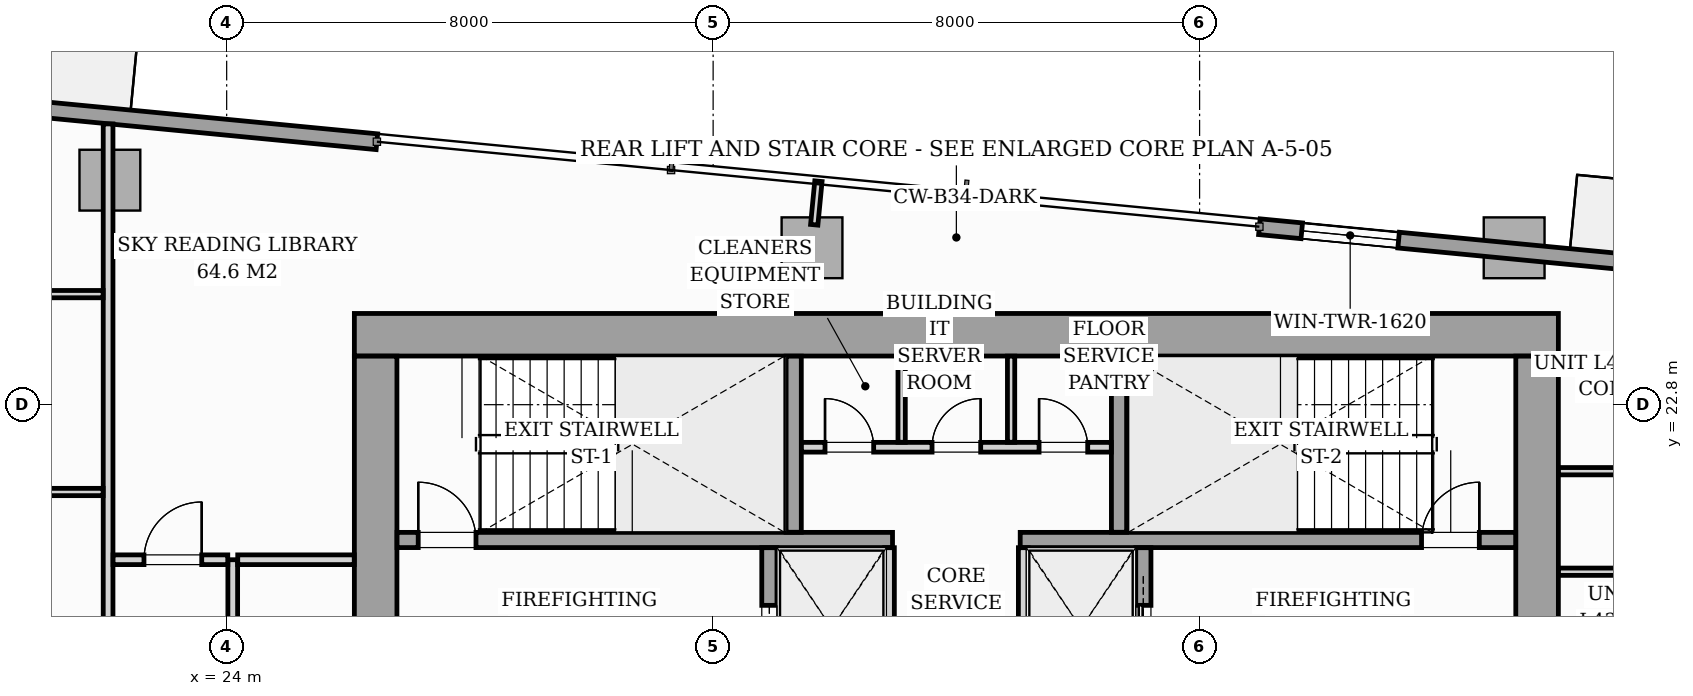
"""IFC4 building model, lengths in metres.
Left out: names, types, materials, properties, quantities, classifications, styles, units other than length and angle.
Written with IfcOpenShell. Run it as: python <this file> out.ifc"""

import sys

from ifc_helpers import new_model, si_unit, direction, frame, frame_2d, origin, origin_2d, place, context, subcontext, project, spatial, rectangle, i_section, extrude, source, transform, mapped, element, fill, save


model = new_model("IFC4")
c1 = context("Model", 3, precision=1e-05, world=origin(), true_north=direction((0.0, 1.0)))
c2 = subcontext(c1, "Body", "Model", "MODEL_VIEW")
j1 = project(units=[si_unit("LENGTHUNIT", "METRE"), si_unit("PLANEANGLEUNIT", "RADIAN")], contexts=[c1])
p1 = place(None, origin())
s1 = spatial("IfcSite", under=j1, at=p1, CompositionType="ELEMENT")
p2 = place(p1, origin())
s2 = spatial("IfcBuilding", under=s1, at=p2, CompositionType="ELEMENT")
p3 = place(p2, frame((0.0, 0.0, 150.2)))
s3 = spatial("IfcBuildingStorey", under=s2, at=p3, CompositionType="ELEMENT", Elevation=150.2)
m1 = source(origin(), c2, "Body", "SweptSolid", [
    extrude(i_section(OverallWidth=0.421, OverallDepth=0.465, WebThickness=0.045, FlangeThickness=0.073, FilletRadius=0.018, at=origin_2d()), origin(), (0.0, 0.0, 1.0), 3.196),
])
for number, where, z_axis, x_axis in (
    (1, (26.4, 24.0, 0.002), (0.0, 0.0, 1.0), (1.0, 0.0, 0.0)),
    (2, (33.12, 24.0, 0.002), (0.0, 0.0, 1.0), (1.0, 0.0, 0.0)),
    (3, (38.88, 24.0, 0.002), (0.0, 0.0, 1.0), (1.0, 0.0, 0.0)),
    (4, (45.6, 24.0, 0.002), (0.0, 0.0, 1.0), (1.0, 0.0, 0.0)),
):
    element("IfcColumn", number, at=place(p3, frame(where, z_axis=z_axis, x_axis=x_axis)), inside=s3, PredefinedType="PILASTER", context=c2, shape_type="MappedRepresentation", body=[
        mapped(m1, transform((0.0, 0.0, 0.0), scale=1.0)),
    ])
m2 = source(origin(), c2, "Body", "SweptSolid", [
    extrude(rectangle(XDim=1.0, YDim=1.0, at=origin_2d()), origin(), (0.0, 0.0, 1.0), 3.196),
])
for number, where, z_axis, x_axis in (
    (5, (22.08, 26.492, 0.002), (0.0, 0.0, 1.0), (0.995, -0.096, 0.0)),
    (6, (33.626, 25.38, 0.002), (0.0, 0.0, 1.0), (0.995, -0.096, 0.0)),
    (7, (45.173, 25.38, 0.002), (0.0, 0.0, 1.0), (0.995, -0.096, 0.0)),
):
    element("IfcColumn", number, at=place(p3, frame(where, z_axis=z_axis, x_axis=x_axis)), inside=s3, PredefinedType="COLUMN", context=c2, shape_type="MappedRepresentation", body=[
        mapped(m2, transform((0.0, 0.0, 0.0), scale=1.0)),
    ])
p4 = place(p3, frame((9.539, 28.754, 0.0), z_axis=(0.0, 0.0, 1.0), x_axis=(0.995397345886, -0.09583383433, 0.0)))
e8 = element("IfcWall", 8, at=p4, inside=s3, PredefinedType="STANDARD", context=c2, shape_type="SweptSolid", body=[
    extrude(rectangle(XDim=17.01, YDim=0.26, at=frame_2d((8.505, 0.0))), origin(), (0.0, 0.0, 1.0), 2.94),
])
p5 = place(p4, frame((6.711, 0.0, 0.0)))
e9 = element("IfcOpeningElement", 9, at=p5, cuts=e8, PredefinedType="OPENING", context=c2, shape_type="SweptSolid", body=[
    extrude(rectangle(XDim=1.8, YDim=2.06, at=frame_2d((0.9, 1.03))), frame((0.0, 0.14, 0.0), z_axis=(0.0, -1.0, 0.0), x_axis=(1.0, 0.0, 0.0)), (0.0, 0.0, 1.0), 0.28),
])
p6 = place(p4, frame((2.05, 0.0, 0.65)))
e10 = element("IfcOpeningElement", 10, at=p6, cuts=e8, PredefinedType="OPENING", context=c2, shape_type="SweptSolid", body=[
    extrude(rectangle(XDim=1.6, YDim=1.5, at=frame_2d((0.8, 0.75))), frame((0.0, 0.14, 0.0), z_axis=(0.0, -1.0, 0.0), x_axis=(1.0, 0.0, 0.0)), (0.0, 0.0, 1.0), 0.28),
])
p7 = place(p3, frame((40.983, 25.727, 0.0), z_axis=(0.0, 0.0, 1.0), x_axis=(0.995395844771, -0.095849424686, 0.0)))
e11 = element("IfcWall", 11, at=p7, inside=s3, PredefinedType="STANDARD", context=c2, shape_type="SweptSolid", body=[
    extrude(rectangle(XDim=17.01, YDim=0.26, at=frame_2d((8.505, 0.0))), origin(), (0.0, 0.0, 1.0), 2.94),
])
p8 = place(p7, frame((9.1, 0.0, 0.0)))
e12 = element("IfcOpeningElement", 12, at=p8, cuts=e11, PredefinedType="OPENING", context=c2, shape_type="SweptSolid", body=[
    extrude(rectangle(XDim=1.8, YDim=2.06, at=frame_2d((0.9, 1.03))), frame((0.0, 0.14, 0.0), z_axis=(0.0, -1.0, 0.0), x_axis=(1.0, 0.0, 0.0)), (0.0, 0.0, 1.0), 0.28),
])
p9 = place(p7, frame((0.7, 0.0, 0.65)))
e13 = element("IfcOpeningElement", 13, at=p9, cuts=e11, PredefinedType="OPENING", context=c2, shape_type="SweptSolid", body=[
    extrude(rectangle(XDim=1.6, YDim=1.5, at=frame_2d((0.8, 0.75))), frame((0.0, 0.14, 0.0), z_axis=(0.0, -1.0, 0.0), x_axis=(1.0, 0.0, 0.0)), (0.0, 0.0, 1.0), 0.28),
])
p10 = place(p3, frame((26.1, 23.95, 0.0), z_axis=(0.0, 0.0, 1.0), x_axis=(1.0, 0.0, 0.0)))
e14 = element("IfcWall", 14, at=p10, inside=s3, PredefinedType="SHEAR", context=c2, shape_type="SweptSolid", body=[
    extrude(rectangle(XDim=19.8, YDim=0.7, at=frame_2d((9.9, 0.0))), origin(), (0.0, 0.0, 1.0), 3.2),
])
for number, where, z_axis, x_axis in (
    (15, (26.45, 17.802, 0.0), (0.0, 0.0, 1.0), (0.0, 1.0, 0.0)),
    (16, (45.55, 17.802, 0.0), (0.0, 0.0, 1.0), (0.0, 1.0, 0.0)),
):
    element("IfcWall", number, at=place(p3, frame(where, z_axis=z_axis, x_axis=x_axis)), inside=s3, PredefinedType="SHEAR", context=c2, shape_type="SweptSolid", body=[
        extrude(rectangle(XDim=5.796, YDim=0.7, at=frame_2d((2.898, 0.0))), origin(), (0.0, 0.0, 1.0), 3.2),
    ])
p11 = place(p3, frame((26.802, 20.575, 0.0), z_axis=(0.0, 0.0, 1.0), x_axis=(1.0, 0.0, 0.0)))
e17 = element("IfcWall", 17, at=p11, inside=s3, PredefinedType="SOLIDWALL", context=c2, shape_type="SweptSolid", body=[
    extrude(rectangle(XDim=8.148, YDim=0.25, at=frame_2d((4.074, 0.0))), origin(), (0.0, 0.0, 1.0), 3.2),
])
p12 = place(p11, frame((0.348, 0.0, 0.0)))
e18 = element("IfcOpeningElement", 18, at=p12, cuts=e17, PredefinedType="OPENING", context=c2, shape_type="SweptSolid", body=[
    extrude(rectangle(XDim=0.95, YDim=2.06, at=frame_2d((0.475, 1.03))), frame((0.0, 0.135, 0.0), z_axis=(0.0, -1.0, 0.0), x_axis=(1.0, 0.0, 0.0)), (0.0, 0.0, 1.0), 0.27),
])
p13 = place(p3, frame((37.05, 20.575, 0.0), z_axis=(0.0, 0.0, 1.0), x_axis=(1.0, 0.0, 0.0)))
e19 = element("IfcWall", 19, at=p13, inside=s3, PredefinedType="SOLIDWALL", context=c2, shape_type="SweptSolid", body=[
    extrude(rectangle(XDim=8.148, YDim=0.25, at=frame_2d((4.074, 0.0))), origin(), (0.0, 0.0, 1.0), 3.2),
])
p14 = place(p13, frame((6.6, 0.0, 0.0)))
e20 = element("IfcOpeningElement", 20, at=p14, cuts=e19, PredefinedType="OPENING", context=c2, shape_type="SweptSolid", body=[
    extrude(rectangle(XDim=0.95, YDim=2.06, at=frame_2d((0.475, 1.03))), frame((0.0, 0.135, 0.0), z_axis=(0.0, -1.0, 0.0), x_axis=(1.0, 0.0, 0.0)), (0.0, 0.0, 1.0), 0.27),
])
for number, where, z_axis, x_axis in (
    (21, (33.325, 20.702, 0.0), (0.0, 0.0, 1.0), (0.0, 1.0, 0.0)),
    (22, (38.675, 20.702, 0.0), (0.0, 0.0, 1.0), (0.0, 1.0, 0.0)),
):
    element("IfcWall", number, at=place(p3, frame(where, z_axis=z_axis, x_axis=x_axis)), inside=s3, PredefinedType="SOLIDWALL", context=c2, shape_type="SweptSolid", body=[
        extrude(rectangle(XDim=2.896, YDim=0.25, at=frame_2d((1.448, 0.0))), origin(), (0.0, 0.0, 1.0), 3.2),
    ])
p15 = place(p3, frame((32.925, 17.802, 0.0), z_axis=(0.0, 0.0, 1.0), x_axis=(0.0, 1.0, 0.0)))
e23 = element("IfcWall", 23, at=p15, inside=s3, PredefinedType="SOLIDWALL", context=c2, shape_type="SweptSolid", body=[
    extrude(rectangle(XDim=2.646, YDim=0.25, at=frame_2d((1.323, 0.0))), origin(), (0.0, 0.0, 1.0), 3.2),
])
p16 = place(p15, frame((0.598, 0.0, 0.0)))
e24 = element("IfcOpeningElement", 24, at=p16, cuts=e23, PredefinedType="OPENING", context=c2, shape_type="SweptSolid", body=[
    extrude(rectangle(XDim=1.1, YDim=2.08, at=frame_2d((0.55, 1.04))), frame((0.0, 0.135, 0.0), z_axis=(0.0, -1.0, 0.0), x_axis=(1.0, 0.0, 0.0)), (0.0, 0.0, 1.0), 0.27),
])
for number, where, z_axis, x_axis in (
    (25, (34.9, 17.802, 0.0), (0.0, 0.0, 1.0), (0.0, 1.0, 0.0)),
    (26, (37.1, 17.802, 0.0), (0.0, 0.0, 1.0), (0.0, 1.0, 0.0)),
):
    element("IfcWall", number, at=place(p3, frame(where, z_axis=z_axis, x_axis=x_axis)), inside=s3, PredefinedType="PARTITIONING", context=c2, shape_type="SweptSolid", body=[
        extrude(rectangle(XDim=2.646, YDim=0.16, at=frame_2d((1.323, 0.0))), origin(), (0.0, 0.0, 1.0), 2.94),
    ])
p17 = place(p3, frame((39.075, 17.802, 0.0), z_axis=(0.0, 0.0, 1.0), x_axis=(0.0, 1.0, 0.0)))
e27 = element("IfcWall", 27, at=p17, inside=s3, PredefinedType="SOLIDWALL", context=c2, shape_type="SweptSolid", body=[
    extrude(rectangle(XDim=2.646, YDim=0.25, at=frame_2d((1.323, 0.0))), origin(), (0.0, 0.0, 1.0), 3.2),
])
p18 = place(p17, frame((0.598, 0.0, 0.0)))
e28 = element("IfcOpeningElement", 28, at=p18, cuts=e27, PredefinedType="OPENING", context=c2, shape_type="SweptSolid", body=[
    extrude(rectangle(XDim=1.1, YDim=2.08, at=frame_2d((0.55, 1.04))), frame((0.0, 0.135, 0.0), z_axis=(0.0, -1.0, 0.0), x_axis=(1.0, 0.0, 0.0)), (0.0, 0.0, 1.0), 0.27),
])
p19 = place(p3, frame((33.452, 22.1, 0.0), z_axis=(0.0, 0.0, 1.0), x_axis=(1.0, 0.0, 0.0)))
e29 = element("IfcWall", 29, at=p19, inside=s3, PredefinedType="PARTITIONING", context=c2, shape_type="SweptSolid", body=[
    extrude(rectangle(XDim=5.096, YDim=0.16, at=frame_2d((2.548, 0.0))), origin(), (0.0, 0.0, 1.0), 2.94),
])
p20 = place(p19, frame((0.388, 0.0, 0.0)))
e30 = element("IfcOpeningElement", 30, at=p20, cuts=e29, PredefinedType="OPENING", context=c2, shape_type="SweptSolid", body=[
    extrude(rectangle(XDim=0.8, YDim=2.05, at=frame_2d((0.4, 1.025))), frame((0.0, 0.09, 0.0), z_axis=(0.0, -1.0, 0.0), x_axis=(1.0, 0.0, 0.0)), (0.0, 0.0, 1.0), 0.18),
])
p21 = place(p19, frame((2.148, 0.0, 0.0)))
e31 = element("IfcOpeningElement", 31, at=p21, cuts=e29, PredefinedType="OPENING", context=c2, shape_type="SweptSolid", body=[
    extrude(rectangle(XDim=0.8, YDim=2.05, at=frame_2d((0.4, 1.025))), frame((0.0, 0.09, 0.0), z_axis=(0.0, -1.0, 0.0), x_axis=(1.0, 0.0, 0.0)), (0.0, 0.0, 1.0), 0.18),
])
p22 = place(p19, frame((3.908, 0.0, 0.0)))
e32 = element("IfcOpeningElement", 32, at=p22, cuts=e29, PredefinedType="OPENING", context=c2, shape_type="SweptSolid", body=[
    extrude(rectangle(XDim=0.8, YDim=2.05, at=frame_2d((0.4, 1.025))), frame((0.0, 0.09, 0.0), z_axis=(0.0, -1.0, 0.0), x_axis=(1.0, 0.0, 0.0)), (0.0, 0.0, 1.0), 0.18),
])
for number, where, z_axis, x_axis in (
    (33, (35.1, 22.182, 0.0), (0.0, 0.0, 1.0), (0.0, 1.0, 0.0)),
    (34, (36.9, 22.182, 0.0), (0.0, 0.0, 1.0), (0.0, 1.0, 0.0)),
):
    element("IfcWall", number, at=place(p3, frame(where, z_axis=z_axis, x_axis=x_axis)), inside=s3, PredefinedType="PARTITIONING", context=c2, shape_type="SweptSolid", body=[
        extrude(rectangle(XDim=1.416, YDim=0.12, at=frame_2d((0.708, 0.0))), origin(), (0.0, 0.0, 1.0), 2.94),
    ])
p23 = place(p3, frame((22.05, 12.632, 0.0), z_axis=(0.0, 0.0, 1.0), x_axis=(0.0, 1.0, 0.0)))
e35 = element("IfcWall", 35, at=p23, inside=s3, PredefinedType="PARTITIONING", context=c2, shape_type="SweptSolid", body=[
    extrude(rectangle(XDim=14.785, YDim=0.16, at=frame_2d((7.393, 0.0))), origin(), (0.0, 0.0, 1.0), 2.94),
])
p24 = place(p23, frame((0.493, 0.0, 0.0)))
e36 = element("IfcOpeningElement", 36, at=p24, cuts=e35, PredefinedType="OPENING", context=c2, shape_type="SweptSolid", body=[
    extrude(rectangle(XDim=0.95, YDim=2.06, at=frame_2d((0.475, 1.03))), frame((0.0, 0.09, 0.0), z_axis=(0.0, -1.0, 0.0), x_axis=(1.0, 0.0, 0.0)), (0.0, 0.0, 1.0), 0.18),
])
p25 = place(p3, frame((6.709, 24.618, 0.0), z_axis=(0.0, 0.0, 1.0), x_axis=(1.0, 0.0, 0.0)))
e37 = element("IfcWall", 37, at=p25, inside=s3, PredefinedType="PARTITIONING", context=c2, shape_type="SweptSolid", body=[
    extrude(rectangle(XDim=15.259, YDim=0.12, at=frame_2d((7.629, 0.0))), origin(), (0.0, 0.0, 1.0), 2.94),
])
p26 = place(p25, frame((9.137, 0.0, 0.0)))
e38 = element("IfcOpeningElement", 38, at=p26, cuts=e37, PredefinedType="OPENING", context=c2, shape_type="SweptSolid", body=[
    extrude(rectangle(XDim=0.85, YDim=2.05, at=frame_2d((0.425, 1.025))), frame((0.0, 0.07, 0.0), z_axis=(0.0, -1.0, 0.0), x_axis=(1.0, 0.0, 0.0)), (0.0, 0.0, 1.0), 0.14),
])
p27 = place(p3, frame((6.396, 21.364, 0.0), z_axis=(0.0, 0.0, 1.0), x_axis=(1.0, 0.0, 0.0)))
e39 = element("IfcWall", 39, at=p27, inside=s3, PredefinedType="PARTITIONING", context=c2, shape_type="SweptSolid", body=[
    extrude(rectangle(XDim=15.572, YDim=0.12, at=frame_2d((7.786, 0.0))), origin(), (0.0, 0.0, 1.0), 2.94),
])
p28 = place(p27, frame((9.45, 0.0, 0.0)))
e40 = element("IfcOpeningElement", 40, at=p28, cuts=e39, PredefinedType="OPENING", context=c2, shape_type="SweptSolid", body=[
    extrude(rectangle(XDim=0.85, YDim=2.05, at=frame_2d((0.425, 1.025))), frame((0.0, 0.07, 0.0), z_axis=(0.0, -1.0, 0.0), x_axis=(1.0, 0.0, 0.0)), (0.0, 0.0, 1.0), 0.14),
])
p29 = place(p3, frame((45.902, 21.706, 0.0), z_axis=(0.0, 0.0, 1.0), x_axis=(1.0, 0.0, 0.0)))
e41 = element("IfcWall", 41, at=p29, inside=s3, PredefinedType="PARTITIONING", context=c2, shape_type="SweptSolid", body=[
    extrude(rectangle(XDim=12.775, YDim=0.12, at=frame_2d((6.388, 0.0))), origin(), (0.0, 0.0, 1.0), 2.94),
])
p30 = place(p29, frame((4.501, 0.0, 0.0)))
e42 = element("IfcOpeningElement", 42, at=p30, cuts=e41, PredefinedType="OPENING", context=c2, shape_type="SweptSolid", body=[
    extrude(rectangle(XDim=0.85, YDim=2.05, at=frame_2d((0.425, 1.025))), frame((0.0, 0.07, 0.0), z_axis=(0.0, -1.0, 0.0), x_axis=(1.0, 0.0, 0.0)), (0.0, 0.0, 1.0), 0.14),
])
p31 = place(p3, frame((45.902, 20.053, 0.0), z_axis=(0.0, 0.0, 1.0), x_axis=(1.0, 0.0, 0.0)))
e43 = element("IfcWall", 43, at=p31, inside=s3, PredefinedType="PARTITIONING", context=c2, shape_type="SweptSolid", body=[
    extrude(rectangle(XDim=14.055, YDim=0.12, at=frame_2d((7.027, 0.0))), origin(), (0.0, 0.0, 1.0), 2.94),
])
p32 = place(p31, frame((4.501, 0.0, 0.0)))
e44 = element("IfcOpeningElement", 44, at=p32, cuts=e43, PredefinedType="OPENING", context=c2, shape_type="SweptSolid", body=[
    extrude(rectangle(XDim=0.85, YDim=2.05, at=frame_2d((0.425, 1.025))), frame((0.0, 0.07, 0.0), z_axis=(0.0, -1.0, 0.0), x_axis=(1.0, 0.0, 0.0)), (0.0, 0.0, 1.0), 0.14),
])
p33 = place(p3, frame((24.1, 14.66, 0.0), z_axis=(0.0, 0.0, 1.0), x_axis=(0.0, 1.0, 0.0)))
e45 = element("IfcWall", 45, at=p33, inside=s3, PredefinedType="PARTITIONING", context=c2, shape_type="SweptSolid", body=[
    extrude(rectangle(XDim=5.59, YDim=0.16, at=frame_2d((2.795, 0.0))), origin(), (0.0, 0.0, 1.0), 2.94),
])
p34 = place(p33, frame((2.36, 0.0, 0.0)))
e46 = element("IfcOpeningElement", 46, at=p34, cuts=e45, PredefinedType="OPENING", context=c2, shape_type="SweptSolid", body=[
    extrude(rectangle(XDim=0.85, YDim=2.0, at=frame_2d((0.425, 1.0))), frame((0.0, 0.09, 0.0), z_axis=(0.0, -1.0, 0.0), x_axis=(1.0, 0.0, 0.0)), (0.0, 0.0, 1.0), 0.18),
])
p35 = place(p3, frame((22.132, 20.25, 0.0), z_axis=(0.0, 0.0, 1.0), x_axis=(1.0, 0.0, 0.0)))
e47 = element("IfcWall", 47, at=p35, inside=s3, PredefinedType="PARTITIONING", context=c2, shape_type="SweptSolid", body=[
    extrude(rectangle(XDim=1.886, YDim=0.16, at=frame_2d((0.943, 0.0))), origin(), (0.0, 0.0, 1.0), 2.94),
])
p36 = place(p35, frame((0.508, 0.0, 0.0)))
e48 = element("IfcOpeningElement", 48, at=p36, cuts=e47, PredefinedType="OPENING", context=c2, shape_type="SweptSolid", body=[
    extrude(rectangle(XDim=0.95, YDim=2.06, at=frame_2d((0.475, 1.03))), frame((0.0, 0.09, 0.0), z_axis=(0.0, -1.0, 0.0), x_axis=(1.0, 0.0, 0.0)), (0.0, 0.0, 1.0), 0.18),
])
p37 = place(p3, frame((24.182, 20.25, 0.0), z_axis=(0.0, 0.0, 1.0), x_axis=(1.0, 0.0, 0.0)))
e49 = element("IfcWall", 49, at=p37, inside=s3, PredefinedType="PARTITIONING", context=c2, shape_type="SweptSolid", body=[
    extrude(rectangle(XDim=1.916, YDim=0.16, at=frame_2d((0.958, 0.0))), origin(), (0.0, 0.0, 1.0), 2.94),
])
p38 = place(p3, frame((33.663, 25.759, 0.0), z_axis=(0.0, 0.0, 1.0), x_axis=(0.095977354523, 0.995383517755, 0.0)))
e50 = element("IfcWall", 50, at=p38, inside=s3, PredefinedType="PARTITIONING", context=c2, shape_type="SweptSolid", body=[
    extrude(rectangle(XDim=0.72, YDim=0.12, at=frame_2d((0.36, 0.0))), origin(), (0.0, 0.0, 1.0), 2.94),
])
m3 = source(origin(), c2, "Body", "SweptSolid", [
    extrude(rectangle(XDim=1.6, YDim=1.5, at=frame_2d((0.8, 0.75))), frame((0.0, 0.03, 0.0), z_axis=(0.0, -1.0, 0.0), x_axis=(1.0, 0.0, 0.0)), (0.0, 0.0, 1.0), 0.06),
])
p39 = place(p9, origin())
e51 = element("IfcWindow", 51, at=p39, inside=s3, PartitioningType="SINGLE_PANEL", PredefinedType="WINDOW", context=c2, shape_type="MappedRepresentation", body=[
    mapped(m3, transform((0.0, 0.0, 0.0), scale=1.0)),
])
fill(e13, e51)
m4 = source(origin(), c2, "Body", "SweptSolid", [
    extrude(rectangle(XDim=0.95, YDim=2.06, at=frame_2d((0.475, 1.03))), frame((0.0, 0.025, 0.0), z_axis=(0.0, -1.0, 0.0), x_axis=(1.0, 0.0, 0.0)), (0.0, 0.0, 1.0), 0.05),
])
p40 = place(p12, origin())
e52 = element("IfcDoor", 52, at=p40, inside=s3, OperationType="SINGLE_SWING_LEFT", PredefinedType="DOOR", context=c2, shape_type="MappedRepresentation", body=[
    mapped(m4, transform((0.0, 0.0, 0.0), scale=1.0)),
])
fill(e18, e52)
p41 = place(p14, origin())
e53 = element("IfcDoor", 53, at=p41, inside=s3, OperationType="SINGLE_SWING_RIGHT", PredefinedType="DOOR", context=c2, shape_type="MappedRepresentation", body=[
    mapped(m4, transform((0.0, 0.0, 0.0), scale=1.0)),
])
fill(e20, e53)
m5 = source(origin(), c2, "Body", "SweptSolid", [
    extrude(rectangle(XDim=1.1, YDim=2.08, at=frame_2d((0.55, 1.04))), frame((0.0, 0.025, 0.0), z_axis=(0.0, -1.0, 0.0), x_axis=(1.0, 0.0, 0.0)), (0.0, 0.0, 1.0), 0.05),
])
p42 = place(p16, origin())
e54 = element("IfcDoor", 54, at=p42, inside=s3, OperationType="SLIDING_TO_LEFT", PredefinedType="DOOR", context=c2, shape_type="MappedRepresentation", body=[
    mapped(m5, transform((0.0, 0.0, 0.0), scale=1.0)),
])
fill(e24, e54)
p43 = place(p18, origin())
e55 = element("IfcDoor", 55, at=p43, inside=s3, OperationType="SLIDING_TO_RIGHT", PredefinedType="DOOR", context=c2, shape_type="MappedRepresentation", body=[
    mapped(m5, transform((0.0, 0.0, 0.0), scale=1.0)),
])
fill(e28, e55)
m6 = source(origin(), c2, "Body", "SweptSolid", [
    extrude(rectangle(XDim=0.8, YDim=2.05, at=frame_2d((0.4, 1.025))), frame((0.0, 0.025, 0.0), z_axis=(0.0, -1.0, 0.0), x_axis=(1.0, 0.0, 0.0)), (0.0, 0.0, 1.0), 0.05),
])
p44 = place(p20, origin())
e56 = element("IfcDoor", 56, at=p44, inside=s3, OperationType="SINGLE_SWING_LEFT", PredefinedType="DOOR", context=c2, shape_type="MappedRepresentation", body=[
    mapped(m6, transform((0.0, 0.0, 0.0), scale=1.0)),
])
fill(e30, e56)
p45 = place(p21, origin())
e57 = element("IfcDoor", 57, at=p45, inside=s3, OperationType="SINGLE_SWING_RIGHT", PredefinedType="DOOR", context=c2, shape_type="MappedRepresentation", body=[
    mapped(m6, transform((0.0, 0.0, 0.0), scale=1.0)),
])
fill(e31, e57)
p46 = place(p22, origin())
e58 = element("IfcDoor", 58, at=p46, inside=s3, OperationType="SINGLE_SWING_LEFT", PredefinedType="DOOR", context=c2, shape_type="MappedRepresentation", body=[
    mapped(m6, transform((0.0, 0.0, 0.0), scale=1.0)),
])
fill(e32, e58)
m7 = source(origin(), c2, "Body", "SweptSolid", [
    extrude(rectangle(XDim=0.95, YDim=2.06, at=frame_2d((0.475, 1.03))), frame((0.0, 0.025, 0.0), z_axis=(0.0, -1.0, 0.0), x_axis=(1.0, 0.0, 0.0)), (0.0, 0.0, 1.0), 0.05),
])
p47 = place(p36, origin())
e59 = element("IfcDoor", 59, at=p47, inside=s3, OperationType="SINGLE_SWING_RIGHT", PredefinedType="DOOR", context=c2, shape_type="MappedRepresentation", body=[
    mapped(m7, transform((0.0, 0.0, 0.0), scale=1.0)),
])
fill(e48, e59)
save(model, sys.argv[1])
